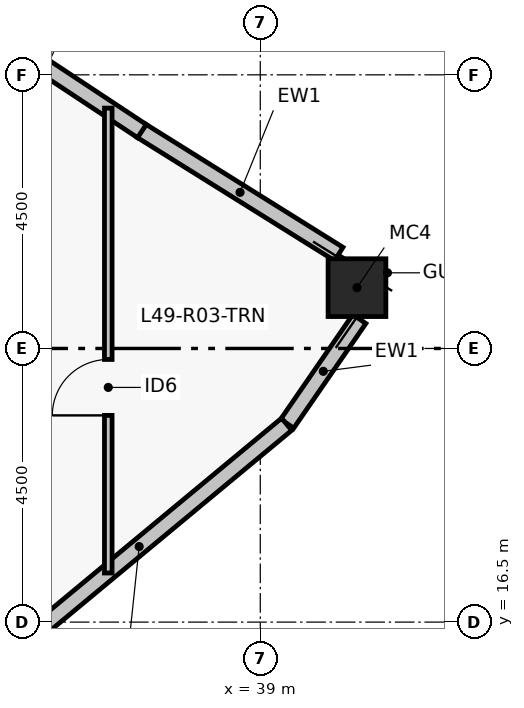
"""IFC4 building model, lengths in metres.
Left out: names, types, materials, properties, quantities, classifications, styles, units other than length and angle.
Written with IfcOpenShell. Run it as: python <this file> out.ifc"""

import sys

from ifc_helpers import new_model, si_unit, direction, frame, frame_2d, origin, origin_2d, place, context, subcontext, project, spatial, rectangle, hollow_rectangle, extrude, element, fill, save


model = new_model("IFC4")
c1 = context("Model", 3, precision=1e-05, world=origin(), true_north=direction((0.0, 1.0)))
c2 = subcontext(c1, "Body", "Model", "MODEL_VIEW")
j1 = project(units=[si_unit("LENGTHUNIT", "METRE"), si_unit("PLANEANGLEUNIT", "RADIAN")], contexts=[c1])
p1 = place(None, origin())
s1 = spatial("IfcSite", under=j1, at=p1, CompositionType="ELEMENT")
p2 = place(p1, origin())
s2 = spatial("IfcBuilding", under=s1, at=p2, CompositionType="ELEMENT")
p3 = place(p2, frame((0.0, 0.0, 195.24)))
s3 = spatial("IfcBuildingStorey", under=s2, at=p3, CompositionType="ELEMENT", Elevation=195.24)
p4 = place(p3, frame((40.591, 22.0, 0.0), z_axis=(0.0, 0.0, 1.0), x_axis=(1.0, 0.0, 0.0)))
e1 = element("IfcColumn", 1, at=p4, inside=s3, PredefinedType="COLUMN", context=c2, shape_type="SweptSolid", body=[
    extrude(hollow_rectangle(XDim=0.95, YDim=0.95, WallThickness=0.04, at=origin_2d()), origin(), (0.0, 0.0, 1.0), 3.72),
])
p5 = place(p3, frame((40.63, 21.485, 0.0), z_axis=(0.0, 0.0, 1.0), x_axis=(-0.5675692026, -0.823325695129, 0.0)))
e2 = element("IfcWall", 2, at=p5, inside=s3, PredefinedType="PARTITIONING", context=c2, shape_type="SweptSolid", body=[
    extrude(rectangle(XDim=2.091, YDim=0.26, at=frame_2d((1.045, 0.0))), origin(), (0.0, 0.0, 1.0), 3.5),
])
p6 = place(p3, frame((37.043, 24.581, 0.0), z_axis=(0.0, 0.0, 1.0), x_axis=(0.848238223581, -0.529614875221, 0.0)))
e3 = element("IfcWall", 3, at=p6, inside=s3, PredefinedType="PARTITIONING", context=c2, shape_type="SweptSolid", body=[
    extrude(rectangle(XDim=3.829, YDim=0.26, at=frame_2d((1.915, 0.0))), origin(), (0.0, 0.0, 1.0), 2.93),
])
p7 = place(p3, frame((33.914, 26.649, 0.0), z_axis=(0.0, 0.0, 1.0), x_axis=(0.834259642914, -0.55137178764, 0.0)))
e4 = element("IfcWall", 4, at=p7, inside=s3, PredefinedType="PARTITIONING", context=c2, shape_type="SweptSolid", body=[
    extrude(rectangle(XDim=3.763, YDim=0.26, at=frame_2d((1.881, 0.0))), origin(), (0.0, 0.0, 1.0), 2.93),
])
p8 = place(p3, frame((39.434, 19.754, 0.0), z_axis=(0.0, 0.0, 1.0), x_axis=(-0.76976213846, -0.638330831304, 0.0)))
e5 = element("IfcWall", 5, at=p8, inside=s3, PredefinedType="PARTITIONING", context=c2, shape_type="SweptSolid", body=[
    extrude(rectangle(XDim=6.303, YDim=0.26, at=frame_2d((3.151, 0.0))), origin(), (0.0, 0.0, 1.0), 3.5),
])
p9 = place(p3, frame((36.5, 17.308, 0.0), z_axis=(0.0, 0.0, 1.0), x_axis=(0.0, 1.0, 0.0)))
e6 = element("IfcWall", 6, at=p9, inside=s3, PredefinedType="PARTITIONING", context=c2, shape_type="SweptSolid", body=[
    extrude(rectangle(XDim=7.645, YDim=0.125, at=frame_2d((3.822, 0.0))), origin(), (0.0, 0.0, 1.0), 2.73),
])
p10 = place(p9, frame((2.592, 0.0, 0.0)))
e7 = element("IfcOpeningElement", 7, at=p10, cuts=e6, PredefinedType="OPENING", context=c2, shape_type="SweptSolid", body=[
    extrude(rectangle(XDim=0.92, YDim=2.05, at=frame_2d((0.46, 1.025))), frame((0.0, 0.073, 0.0), z_axis=(0.0, -1.0, 0.0), x_axis=(1.0, 0.0, 0.0)), (0.0, 0.0, 1.0), 0.145),
])
p11 = place(p10, origin())
e8 = element("IfcDoor", 8, at=p11, inside=s3, OperationType="SINGLE_SWING_LEFT", PredefinedType="DOOR", context=c2, shape_type="SweptSolid", body=[
    extrude(rectangle(XDim=0.92, YDim=2.05, at=frame_2d((0.46, 1.025))), frame((0.0, 0.025, 0.0), z_axis=(0.0, -1.0, 0.0), x_axis=(1.0, 0.0, 0.0)), (0.0, 0.0, 1.0), 0.05),
])
fill(e7, e8)
save(model, sys.argv[1])
